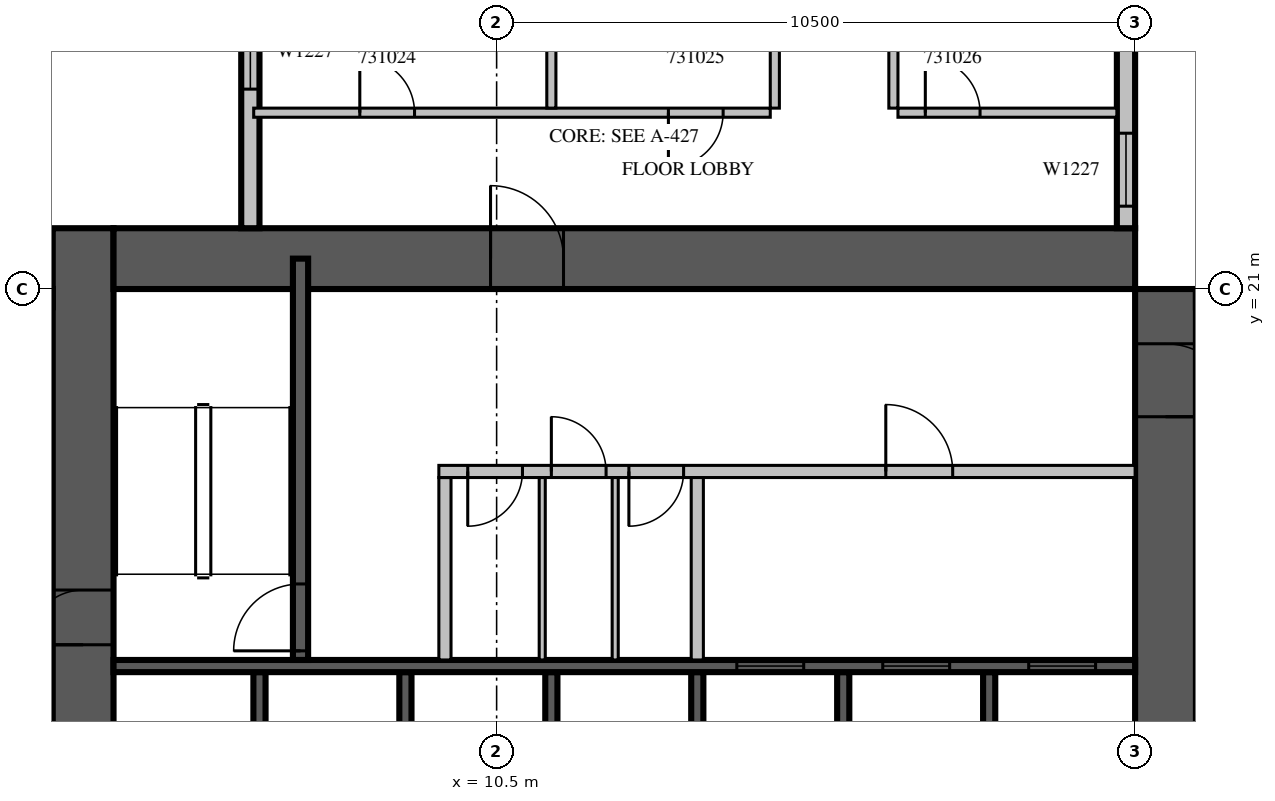
"""IFC4 building model, lengths in metres.
Left out: names, types, materials, properties, quantities, classifications, styles, units other than length and angle.
Written with IfcOpenShell. Run it as: python <this file> out.ifc"""

import sys

from ifc_helpers import new_model, si_unit, direction, frame, frame_2d, origin, place, context, subcontext, project, spatial, rectangle, extrude, source, transform, mapped, element, fill, save


model = new_model("IFC4")
c1 = context("Model", 3, precision=1e-05, world=origin(), true_north=direction((0.0, 1.0)))
c2 = subcontext(c1, "Body", "Model", "MODEL_VIEW")
j1 = project(units=[si_unit("LENGTHUNIT", "METRE"), si_unit("PLANEANGLEUNIT", "RADIAN")], contexts=[c1])
p1 = place(None, origin())
s1 = spatial("IfcSite", under=j1, at=p1, CompositionType="ELEMENT")
p2 = place(p1, origin())
s2 = spatial("IfcBuilding", under=s1, at=p2, CompositionType="ELEMENT")
p3 = place(p2, frame((0.0, 0.0, 141.3)))
s3 = spatial("IfcBuildingStorey", under=s2, at=p3, CompositionType="ELEMENT", Elevation=141.3)
m1 = source(origin(), c2, "Body", "SweptSolid", [
    extrude(rectangle(XDim=17.8, YDim=1.0, at=frame_2d((8.9, 0.0))), origin(), (0.0, 0.0, 1.0), 4.2),
])
p4 = place(p3, frame((3.7, 4.2, 0.0), z_axis=(0.0, 0.0, 1.0), x_axis=(0.0, 1.0, 0.0)))
e1 = element("IfcWall", 1, at=p4, inside=s3, PredefinedType="SHEAR", context=c2, shape_type="MappedRepresentation", body=[
    mapped(m1, transform((0.0, 0.0, 0.0), scale=1.0)),
])
m2 = source(origin(), c2, "Body", "SweptSolid", [
    extrude(rectangle(XDim=2.2, YDim=2.1, at=frame_2d((1.1, 1.05))), frame((0.0, 0.51, 0.0), z_axis=(0.0, -1.0, 0.0), x_axis=(1.0, 0.0, 0.0)), (0.0, 0.0, 1.0), 1.02),
])
p5 = place(p4, frame((4.2, 0.0, 0.0)))
e2 = element("IfcOpeningElement", 2, at=p5, cuts=e1, PredefinedType="OPENING", context=c2, shape_type="MappedRepresentation", body=[
    mapped(m2, transform((0.0, 0.0, 0.0), scale=1.0)),
])
m3 = source(origin(), c2, "Body", "SweptSolid", [
    extrude(rectangle(XDim=0.9, YDim=2.1, at=frame_2d((0.45, 1.05))), frame((0.0, 0.51, 0.0), z_axis=(0.0, -1.0, 0.0), x_axis=(1.0, 0.0, 0.0)), (0.0, 0.0, 1.0), 1.02),
])
p6 = place(p4, frame((10.95, 0.0, 0.0)))
e3 = element("IfcOpeningElement", 3, at=p6, cuts=e1, PredefinedType="OPENING", context=c2, shape_type="MappedRepresentation", body=[
    mapped(m3, transform((0.0, 0.0, 0.0), scale=1.0)),
])
m4 = source(origin(), c2, "Body", "SweptSolid", [
    extrude(rectangle(XDim=16.8, YDim=1.0, at=frame_2d((8.4, 0.0))), origin(), (0.0, 0.0, 1.0), 4.2),
])
p7 = place(p3, frame((21.5, 4.2, 0.0), z_axis=(0.0, 0.0, 1.0), x_axis=(0.0, 1.0, 0.0)))
e4 = element("IfcWall", 4, at=p7, inside=s3, PredefinedType="SHEAR", context=c2, shape_type="MappedRepresentation", body=[
    mapped(m4, transform((0.0, 0.0, 0.0), scale=1.0)),
])
p8 = place(p7, frame((4.2, 0.0, 0.0)))
e5 = element("IfcOpeningElement", 5, at=p8, cuts=e4, PredefinedType="OPENING", context=c2, shape_type="MappedRepresentation", body=[
    mapped(m2, transform((0.0, 0.0, 0.0), scale=1.0)),
])
m5 = source(origin(), c2, "Body", "SweptSolid", [
    extrude(rectangle(XDim=1.2, YDim=2.1, at=frame_2d((0.6, 1.05))), frame((0.0, 0.51, 0.0), z_axis=(0.0, -1.0, 0.0), x_axis=(1.0, 0.0, 0.0)), (0.0, 0.0, 1.0), 1.02),
])
p9 = place(p7, frame((14.7, 0.0, 0.0)))
e6 = element("IfcOpeningElement", 6, at=p9, cuts=e4, PredefinedType="OPENING", context=c2, shape_type="MappedRepresentation", body=[
    mapped(m5, transform((0.0, 0.0, 0.0), scale=1.0)),
])
p10 = place(p3, frame((4.2, 21.5, 0.0), z_axis=(0.0, 0.0, 1.0), x_axis=(1.0, 0.0, 0.0)))
e7 = element("IfcWall", 7, at=p10, inside=s3, PredefinedType="SHEAR", context=c2, shape_type="MappedRepresentation", body=[
    mapped(m4, transform((0.0, 0.0, 0.0), scale=1.0)),
])
p11 = place(p10, frame((6.2, 0.0, 0.0)))
e8 = element("IfcOpeningElement", 8, at=p11, cuts=e7, PredefinedType="OPENING", context=c2, shape_type="MappedRepresentation", body=[
    mapped(m5, transform((0.0, 0.0, 0.0), scale=1.0)),
])
m6 = source(origin(), c2, "Body", "SweptSolid", [
    extrude(rectangle(XDim=6.875, YDim=0.3, at=frame_2d((3.438, 0.0))), origin(), (0.0, 0.0, 1.0), 3.8),
])
p12 = place(p3, frame((20.85, 22.0, 0.0), z_axis=(0.0, 0.0, 1.0), x_axis=(0.0, 1.0, 0.0)))
e9 = element("IfcWall", 9, at=p12, inside=s3, PredefinedType="STANDARD", context=c2, shape_type="MappedRepresentation", body=[
    mapped(m6, transform((0.0, 0.0, 0.0), scale=1.0)),
])
m7 = source(origin(), c2, "Body", "SweptSolid", [
    extrude(rectangle(XDim=1.2, YDim=2.7, at=frame_2d((0.6, 1.35))), frame((0.0, 0.16, 0.0), z_axis=(0.0, -1.0, 0.0), x_axis=(1.0, 0.0, 0.0)), (0.0, 0.0, 1.0), 0.32),
])
p13 = place(p12, frame((0.362, 0.0, 0.6)))
e10 = element("IfcOpeningElement", 10, at=p13, cuts=e9, PredefinedType="OPENING", context=c2, shape_type="MappedRepresentation", body=[
    mapped(m7, transform((0.0, 0.0, 0.0), scale=1.0)),
])
m8 = source(origin(), c2, "Body", "SweptSolid", [
    extrude(rectangle(XDim=2.4, YDim=2.7, at=frame_2d((1.2, 1.35))), frame((0.0, 0.16, 0.0), z_axis=(0.0, -1.0, 0.0), x_axis=(1.0, 0.0, 0.0)), (0.0, 0.0, 1.0), 0.32),
])
p14 = place(p12, frame((4.1, 0.0, 0.6)))
e11 = element("IfcOpeningElement", 11, at=p14, cuts=e9, PredefinedType="OPENING", context=c2, shape_type="MappedRepresentation", body=[
    mapped(m8, transform((0.0, 0.0, 0.0), scale=1.0)),
])
m9 = source(origin(), c2, "Body", "SweptSolid", [
    extrude(rectangle(XDim=16.4, YDim=0.3, at=frame_2d((8.2, 0.0))), origin(), (0.0, 0.0, 1.0), 3.8),
])
p15 = place(p3, frame((6.45, 38.4, 0.0), z_axis=(0.0, 0.0, 1.0), x_axis=(0.0, -1.0, 0.0)))
e12 = element("IfcWall", 12, at=p15, inside=s3, PredefinedType="STANDARD", context=c2, shape_type="MappedRepresentation", body=[
    mapped(m9, transform((0.0, 0.0, 0.0), scale=1.0)),
])
m10 = source(origin(), c2, "Body", "SweptSolid", [
    extrude(rectangle(XDim=1.8, YDim=2.7, at=frame_2d((0.9, 1.35))), frame((0.0, 0.16, 0.0), z_axis=(0.0, -1.0, 0.0), x_axis=(1.0, 0.0, 0.0)), (0.0, 0.0, 1.0), 0.32),
])
p16 = place(p15, frame((1.15, 0.0, 0.6)))
e13 = element("IfcOpeningElement", 13, at=p16, cuts=e12, PredefinedType="OPENING", context=c2, shape_type="MappedRepresentation", body=[
    mapped(m10, transform((0.0, 0.0, 0.0), scale=1.0)),
])
p17 = place(p15, frame((9.438, 0.0, 0.6)))
e14 = element("IfcOpeningElement", 14, at=p17, cuts=e12, PredefinedType="OPENING", context=c2, shape_type="MappedRepresentation", body=[
    mapped(m10, transform((0.0, 0.0, 0.0), scale=1.0)),
])
p18 = place(p15, frame((12.912, 0.0, 0.6)))
e15 = element("IfcOpeningElement", 15, at=p18, cuts=e12, PredefinedType="OPENING", context=c2, shape_type="MappedRepresentation", body=[
    mapped(m7, transform((0.0, 0.0, 0.0), scale=1.0)),
])
m11 = source(origin(), c2, "Body", "SweptSolid", [
    extrude(rectangle(XDim=1.0, YDim=2.1, at=frame_2d((0.5, 1.05))), frame((0.0, 0.16, 0.0), z_axis=(0.0, -1.0, 0.0), x_axis=(1.0, 0.0, 0.0)), (0.0, 0.0, 1.0), 0.32),
])
p19 = place(p15, frame((5.908, 0.0, 0.0)))
e16 = element("IfcOpeningElement", 16, at=p19, cuts=e12, PredefinedType="OPENING", context=c2, shape_type="MappedRepresentation", body=[
    mapped(m11, transform((0.0, 0.0, 0.0), scale=1.0)),
])
m12 = source(origin(), c2, "Body", "SweptSolid", [
    extrude(rectangle(XDim=3.0, YDim=0.2, at=frame_2d((1.5, 0.0))), origin(), (0.0, 0.0, 1.0), 4.2),
])
for number, where, z_axis, x_axis in (
    (17, (6.6, 11.7, 0.0), (0.0, 0.0, 1.0), (0.0, 1.0, 0.0)),
    (18, (9.0, 11.7, 0.0), (0.0, 0.0, 1.0), (0.0, 1.0, 0.0)),
    (19, (11.4, 11.7, 0.0), (0.0, 0.0, 1.0), (0.0, 1.0, 0.0)),
    (20, (13.8, 11.7, 0.0), (0.0, 0.0, 1.0), (0.0, 1.0, 0.0)),
    (21, (16.2, 11.7, 0.0), (0.0, 0.0, 1.0), (0.0, 1.0, 0.0)),
    (22, (18.6, 11.7, 0.0), (0.0, 0.0, 1.0), (0.0, 1.0, 0.0)),
):
    element("IfcWall", number, at=place(p3, frame(where, z_axis=z_axis, x_axis=x_axis)), inside=s3, PredefinedType="SOLIDWALL", context=c2, shape_type="MappedRepresentation", body=[
        mapped(m12, transform((0.0, 0.0, 0.0), scale=1.0)),
    ])
m13 = source(origin(), c2, "Body", "SweptSolid", [
    extrude(rectangle(XDim=16.8, YDim=0.2, at=frame_2d((8.4, 0.0))), origin(), (0.0, 0.0, 1.0), 4.2),
])
p20 = place(p3, frame((4.2, 14.8, 0.0), z_axis=(0.0, 0.0, 1.0), x_axis=(1.0, 0.0, 0.0)))
e23 = element("IfcWall", 23, at=p20, inside=s3, PredefinedType="SOLIDWALL", context=c2, shape_type="MappedRepresentation", body=[
    mapped(m13, transform((0.0, 0.0, 0.0), scale=1.0)),
])
m14 = source(origin(), c2, "Body", "SweptSolid", [
    extrude(rectangle(XDim=1.1, YDim=2.1, at=frame_2d((0.55, 1.05))), frame((0.0, 0.11, 0.0), z_axis=(0.0, -1.0, 0.0), x_axis=(1.0, 0.0, 0.0)), (0.0, 0.0, 1.0), 0.22),
])
p21 = place(p20, frame((10.25, 0.0, 0.0)))
e24 = element("IfcOpeningElement", 24, at=p21, cuts=e23, PredefinedType="OPENING", context=c2, shape_type="MappedRepresentation", body=[
    mapped(m14, transform((0.0, 0.0, 0.0), scale=1.0)),
])
p22 = place(p20, frame((12.65, 0.0, 0.0)))
e25 = element("IfcOpeningElement", 25, at=p22, cuts=e23, PredefinedType="OPENING", context=c2, shape_type="MappedRepresentation", body=[
    mapped(m14, transform((0.0, 0.0, 0.0), scale=1.0)),
])
p23 = place(p20, frame((15.05, 0.0, 0.0)))
e26 = element("IfcOpeningElement", 26, at=p23, cuts=e23, PredefinedType="OPENING", context=c2, shape_type="MappedRepresentation", body=[
    mapped(m14, transform((0.0, 0.0, 0.0), scale=1.0)),
])
m15 = source(origin(), c2, "Body", "SweptSolid", [
    extrude(rectangle(XDim=6.6, YDim=0.25, at=frame_2d((3.3, 0.0))), origin(), (0.0, 0.0, 1.0), 3.8),
])
p24 = place(p3, frame((7.275, 14.9, 0.0), z_axis=(0.0, 0.0, 1.0), x_axis=(0.0, 1.0, 0.0)))
e27 = element("IfcWall", 27, at=p24, inside=s3, PredefinedType="SOLIDWALL", context=c2, shape_type="MappedRepresentation", body=[
    mapped(m15, transform((0.0, 0.0, 0.0), scale=1.0)),
])
m16 = source(origin(), c2, "Body", "SweptSolid", [
    extrude(rectangle(XDim=1.1, YDim=2.1, at=frame_2d((0.55, 1.05))), frame((0.0, 0.135, 0.0), z_axis=(0.0, -1.0, 0.0), x_axis=(1.0, 0.0, 0.0)), (0.0, 0.0, 1.0), 0.27),
])
p25 = place(p24, frame((0.15, 0.0, 0.0)))
e28 = element("IfcOpeningElement", 28, at=p25, cuts=e27, PredefinedType="OPENING", context=c2, shape_type="MappedRepresentation", body=[
    mapped(m16, transform((0.0, 0.0, 0.0), scale=1.0)),
])
m17 = source(origin(), c2, "Body", "SweptSolid", [
    extrude(rectangle(XDim=3.0, YDim=0.2, at=frame_2d((1.5, 0.0))), origin(), (0.0, 0.0, 1.0), 3.8),
])
p26 = place(p3, frame((9.65, 14.9, 0.0), z_axis=(0.0, 0.0, 1.0), x_axis=(0.0, 1.0, 0.0)))
e29 = element("IfcWall", 29, at=p26, inside=s3, PredefinedType="PARTITIONING", context=c2, shape_type="MappedRepresentation", body=[
    mapped(m17, transform((0.0, 0.0, 0.0), scale=1.0)),
])
m18 = source(origin(), c2, "Body", "SweptSolid", [
    extrude(rectangle(XDim=11.45, YDim=0.2, at=frame_2d((5.725, 0.0))), origin(), (0.0, 0.0, 1.0), 3.8),
])
p27 = place(p3, frame((9.55, 18.0, 0.0), z_axis=(0.0, 0.0, 1.0), x_axis=(1.0, 0.0, 0.0)))
e30 = element("IfcWall", 30, at=p27, inside=s3, PredefinedType="PARTITIONING", context=c2, shape_type="MappedRepresentation", body=[
    mapped(m18, transform((0.0, 0.0, 0.0), scale=1.0)),
])
m19 = source(origin(), c2, "Body", "SweptSolid", [
    extrude(rectangle(XDim=0.9, YDim=2.1, at=frame_2d((0.45, 1.05))), frame((0.0, 0.11, 0.0), z_axis=(0.0, -1.0, 0.0), x_axis=(1.0, 0.0, 0.0)), (0.0, 0.0, 1.0), 0.22),
])
p28 = place(p27, frame((0.475, 0.0, 0.0)))
e31 = element("IfcOpeningElement", 31, at=p28, cuts=e30, PredefinedType="OPENING", context=c2, shape_type="MappedRepresentation", body=[
    mapped(m19, transform((0.0, 0.0, 0.0), scale=1.0)),
])
p29 = place(p27, frame((1.85, 0.0, 0.0)))
e32 = element("IfcOpeningElement", 32, at=p29, cuts=e30, PredefinedType="OPENING", context=c2, shape_type="MappedRepresentation", body=[
    mapped(m19, transform((0.0, 0.0, 0.0), scale=1.0)),
])
p30 = place(p27, frame((3.125, 0.0, 0.0)))
e33 = element("IfcOpeningElement", 33, at=p30, cuts=e30, PredefinedType="OPENING", context=c2, shape_type="MappedRepresentation", body=[
    mapped(m19, transform((0.0, 0.0, 0.0), scale=1.0)),
])
p31 = place(p27, frame((7.35, 0.0, 0.0)))
e34 = element("IfcOpeningElement", 34, at=p31, cuts=e30, PredefinedType="OPENING", context=c2, shape_type="MappedRepresentation", body=[
    mapped(m14, transform((0.0, 0.0, 0.0), scale=1.0)),
])
p32 = place(p3, frame((13.8, 14.9, 0.0), z_axis=(0.0, 0.0, 1.0), x_axis=(0.0, 1.0, 0.0)))
e35 = element("IfcWall", 35, at=p32, inside=s3, PredefinedType="PARTITIONING", context=c2, shape_type="MappedRepresentation", body=[
    mapped(m17, transform((0.0, 0.0, 0.0), scale=1.0)),
])
m20 = source(origin(), c2, "Body", "SweptSolid", [
    extrude(rectangle(XDim=3.0, YDim=0.1, at=frame_2d((1.5, 0.0))), origin(), (0.0, 0.0, 1.0), 3.8),
])
for number, where, z_axis, x_axis in (
    (36, (11.25, 14.9, 0.0), (0.0, 0.0, 1.0), (0.0, 1.0, 0.0)),
    (37, (12.45, 14.9, 0.0), (0.0, 0.0, 1.0), (0.0, 1.0, 0.0)),
):
    element("IfcWall", number, at=place(p3, frame(where, z_axis=z_axis, x_axis=x_axis)), inside=s3, PredefinedType="PARTITIONING", context=c2, shape_type="MappedRepresentation", body=[
        mapped(m20, transform((0.0, 0.0, 0.0), scale=1.0)),
    ])
m21 = source(origin(), c2, "Body", "SweptSolid", [
    extrude(rectangle(XDim=8.495, YDim=0.15, at=frame_2d((4.247, 0.0))), origin(), (0.0, 0.0, 1.0), 3.8),
])
p33 = place(p3, frame((6.505, 23.9, 0.0), z_axis=(0.0, 0.0, 1.0), x_axis=(1.0, 0.0, 0.0)))
e38 = element("IfcWall", 38, at=p33, inside=s3, PredefinedType="PARTITIONING", context=c2, shape_type="MappedRepresentation", body=[
    mapped(m21, transform((0.0, 0.0, 0.0), scale=1.0)),
])
m22 = source(origin(), c2, "Body", "SweptSolid", [
    extrude(rectangle(XDim=0.9, YDim=2.1, at=frame_2d((0.45, 1.05))), frame((0.0, 0.085, 0.0), z_axis=(0.0, -1.0, 0.0), x_axis=(1.0, 0.0, 0.0)), (0.0, 0.0, 1.0), 0.17),
])
p34 = place(p33, frame((1.745, 0.0, 0.0)))
e39 = element("IfcOpeningElement", 39, at=p34, cuts=e38, PredefinedType="OPENING", context=c2, shape_type="MappedRepresentation", body=[
    mapped(m22, transform((0.0, 0.0, 0.0), scale=1.0)),
])
p35 = place(p33, frame((6.82, 0.0, 0.0)))
e40 = element("IfcOpeningElement", 40, at=p35, cuts=e38, PredefinedType="OPENING", context=c2, shape_type="MappedRepresentation", body=[
    mapped(m22, transform((0.0, 0.0, 0.0), scale=1.0)),
])
m23 = source(origin(), c2, "Body", "SweptSolid", [
    extrude(rectangle(XDim=3.6, YDim=0.15, at=frame_2d((1.8, 0.0))), origin(), (0.0, 0.0, 1.0), 3.8),
])
p36 = place(p3, frame((17.1, 23.9, 0.0), z_axis=(0.0, 0.0, 1.0), x_axis=(1.0, 0.0, 0.0)))
e41 = element("IfcWall", 41, at=p36, inside=s3, PredefinedType="PARTITIONING", context=c2, shape_type="MappedRepresentation", body=[
    mapped(m23, transform((0.0, 0.0, 0.0), scale=1.0)),
])
p37 = place(p36, frame((0.45, 0.0, 0.0)))
e42 = element("IfcOpeningElement", 42, at=p37, cuts=e41, PredefinedType="OPENING", context=c2, shape_type="MappedRepresentation", body=[
    mapped(m22, transform((0.0, 0.0, 0.0), scale=1.0)),
])
m24 = source(origin(), c2, "Body", "SweptSolid", [
    extrude(rectangle(XDim=5.35, YDim=0.15, at=frame_2d((2.675, 0.0))), origin(), (0.0, 0.0, 1.0), 3.8),
])
for number, where, z_axis, x_axis in (
    (43, (11.4, 23.975, 0.0), (0.0, 0.0, 1.0), (0.0, 1.0, 0.0)),
    (44, (15.075, 23.975, 0.0), (0.0, 0.0, 1.0), (0.0, 1.0, 0.0)),
    (45, (17.025, 29.325, 0.0), (0.0, 0.0, 1.0), (0.0, -1.0, 0.0)),
):
    element("IfcWall", number, at=place(p3, frame(where, z_axis=z_axis, x_axis=x_axis)), inside=s3, PredefinedType="PARTITIONING", context=c2, shape_type="MappedRepresentation", body=[
        mapped(m24, transform((0.0, 0.0, 0.0), scale=1.0)),
    ])
m25 = source(origin(), c2, "Body", "SweptSolid", [
    extrude(rectangle(XDim=1.2, YDim=2.7, at=frame_2d((0.6, 1.35))), frame((0.0, 0.03, 0.0), z_axis=(0.0, -1.0, 0.0), x_axis=(1.0, 0.0, 0.0)), (0.0, 0.0, 1.0), 0.06),
])
p38 = place(p13, origin())
e46 = element("IfcWindow", 46, at=p38, inside=s3, PartitioningType="SINGLE_PANEL", PredefinedType="WINDOW", context=c2, shape_type="MappedRepresentation", body=[
    mapped(m25, transform((0.0, 0.0, 0.0), scale=1.0)),
])
fill(e10, e46)
p39 = place(p18, origin())
e47 = element("IfcWindow", 47, at=p39, inside=s3, PartitioningType="SINGLE_PANEL", PredefinedType="WINDOW", context=c2, shape_type="MappedRepresentation", body=[
    mapped(m25, transform((0.0, 0.0, 0.0), scale=1.0)),
])
fill(e15, e47)
m26 = source(origin(), c2, "Body", "SweptSolid", [
    extrude(rectangle(XDim=1.1, YDim=2.1, at=frame_2d((0.55, 1.05))), frame((0.0, 0.025, 0.0), z_axis=(0.0, -1.0, 0.0), x_axis=(1.0, 0.0, 0.0)), (0.0, 0.0, 1.0), 0.05),
])
p40 = place(p21, origin())
e48 = element("IfcDoor", 48, at=p40, inside=s3, OperationType="SLIDING_TO_LEFT", PredefinedType="DOOR", context=c2, shape_type="MappedRepresentation", body=[
    mapped(m26, transform((0.0, 0.0, 0.0), scale=1.0)),
])
fill(e24, e48)
p41 = place(p22, origin())
e49 = element("IfcDoor", 49, at=p41, inside=s3, OperationType="SLIDING_TO_LEFT", PredefinedType="DOOR", context=c2, shape_type="MappedRepresentation", body=[
    mapped(m26, transform((0.0, 0.0, 0.0), scale=1.0)),
])
fill(e25, e49)
p42 = place(p23, origin())
e50 = element("IfcDoor", 50, at=p42, inside=s3, OperationType="SLIDING_TO_LEFT", PredefinedType="DOOR", context=c2, shape_type="MappedRepresentation", body=[
    mapped(m26, transform((0.0, 0.0, 0.0), scale=1.0)),
])
fill(e26, e50)
p43 = place(p25, origin())
e51 = element("IfcDoor", 51, at=p43, inside=s3, OperationType="SINGLE_SWING_LEFT", PredefinedType="DOOR", context=c2, shape_type="MappedRepresentation", body=[
    mapped(m26, transform((0.0, 0.0, 0.0), scale=1.0)),
])
fill(e28, e51)
m27 = source(origin(), c2, "Body", "SweptSolid", [
    extrude(rectangle(XDim=0.9, YDim=2.1, at=frame_2d((0.45, 1.05))), frame((0.0, 0.025, 0.0), z_axis=(0.0, -1.0, 0.0), x_axis=(1.0, 0.0, 0.0)), (0.0, 0.0, 1.0), 0.05),
])
p44 = place(p28, origin())
e52 = element("IfcDoor", 52, at=p44, inside=s3, OperationType="SINGLE_SWING_RIGHT", PredefinedType="DOOR", context=c2, shape_type="MappedRepresentation", body=[
    mapped(m27, transform((0.0, 0.0, 0.0), scale=1.0)),
])
fill(e31, e52)
p45 = place(p29, origin())
e53 = element("IfcDoor", 53, at=p45, inside=s3, OperationType="SINGLE_SWING_LEFT", PredefinedType="DOOR", context=c2, shape_type="MappedRepresentation", body=[
    mapped(m27, transform((0.0, 0.0, 0.0), scale=1.0)),
])
fill(e32, e53)
p46 = place(p30, origin())
e54 = element("IfcDoor", 54, at=p46, inside=s3, OperationType="SINGLE_SWING_RIGHT", PredefinedType="DOOR", context=c2, shape_type="MappedRepresentation", body=[
    mapped(m27, transform((0.0, 0.0, 0.0), scale=1.0)),
])
fill(e33, e54)
p47 = place(p31, origin())
e55 = element("IfcDoor", 55, at=p47, inside=s3, OperationType="SINGLE_SWING_LEFT", PredefinedType="DOOR", context=c2, shape_type="MappedRepresentation", body=[
    mapped(m26, transform((0.0, 0.0, 0.0), scale=1.0)),
])
fill(e34, e55)
m28 = source(origin(), c2, "Body", "SweptSolid", [
    extrude(rectangle(XDim=1.2, YDim=2.1, at=frame_2d((0.6, 1.05))), frame((0.0, 0.025, 0.0), z_axis=(0.0, -1.0, 0.0), x_axis=(1.0, 0.0, 0.0)), (0.0, 0.0, 1.0), 0.05),
])
p48 = place(p11, origin())
e56 = element("IfcDoor", 56, at=p48, inside=s3, OperationType="SINGLE_SWING_LEFT", PredefinedType="DOOR", context=c2, shape_type="MappedRepresentation", body=[
    mapped(m28, transform((0.0, 0.0, 0.0), scale=1.0)),
])
fill(e8, e56)
p49 = place(p9, origin())
e57 = element("IfcDoor", 57, at=p49, inside=s3, OperationType="SINGLE_SWING_RIGHT", PredefinedType="DOOR", context=c2, shape_type="MappedRepresentation", body=[
    mapped(m28, transform((0.0, 0.0, 0.0), scale=1.0)),
])
fill(e6, e57)
p50 = place(p6, origin())
e58 = element("IfcDoor", 58, at=p50, inside=s3, OperationType="SINGLE_SWING_LEFT", PredefinedType="DOOR", context=c2, shape_type="MappedRepresentation", body=[
    mapped(m27, transform((0.0, 0.0, 0.0), scale=1.0)),
])
fill(e3, e58)
p51 = place(p34, origin())
e59 = element("IfcDoor", 59, at=p51, inside=s3, OperationType="SINGLE_SWING_LEFT", PredefinedType="DOOR", context=c2, shape_type="MappedRepresentation", body=[
    mapped(m27, transform((0.0, 0.0, 0.0), scale=1.0)),
])
fill(e39, e59)
p52 = place(p35, origin())
e60 = element("IfcDoor", 60, at=p52, inside=s3, OperationType="SINGLE_SWING_RIGHT", PredefinedType="DOOR", context=c2, shape_type="MappedRepresentation", body=[
    mapped(m27, transform((0.0, 0.0, 0.0), scale=1.0)),
])
fill(e40, e60)
p53 = place(p37, origin())
e61 = element("IfcDoor", 61, at=p53, inside=s3, OperationType="SINGLE_SWING_LEFT", PredefinedType="DOOR", context=c2, shape_type="MappedRepresentation", body=[
    mapped(m27, transform((0.0, 0.0, 0.0), scale=1.0)),
])
fill(e42, e61)
save(model, sys.argv[1])
